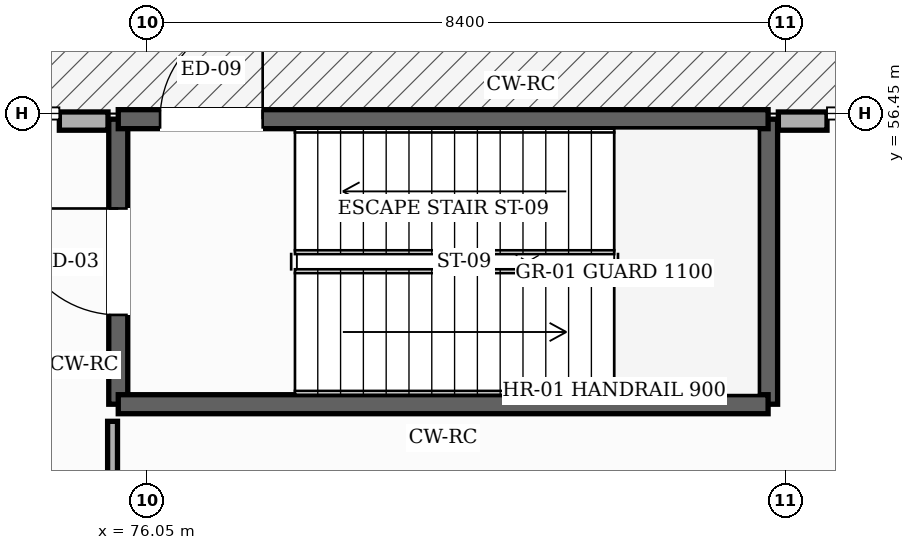
"""IFC4 building model, lengths in metres.
Left out: names, types, materials, properties, quantities, classifications, styles, units other than length and angle.
Written with IfcOpenShell. Run it as: python <this file> out.ifc"""

import sys

from ifc_helpers import new_model, si_unit, direction, frame, frame_2d, origin, place, context, subcontext, project, spatial, rectangle, extrude, element, fill, save


model = new_model("IFC4")
c1 = context("Model", 3, precision=1e-05, world=origin(), true_north=direction((0.0, 1.0)))
c2 = subcontext(c1, "Body", "Model", "MODEL_VIEW")
j1 = project(units=[si_unit("LENGTHUNIT", "METRE"), si_unit("PLANEANGLEUNIT", "RADIAN")], contexts=[c1])
p1 = place(None, origin())
s1 = spatial("IfcSite", under=j1, at=p1, CompositionType="ELEMENT")
p2 = place(p1, origin())
s2 = spatial("IfcBuilding", under=s1, at=p2, CompositionType="ELEMENT")
p3 = place(p2, origin())
s3 = spatial("IfcBuildingStorey", under=s2, at=p3, CompositionType="ELEMENT", Elevation=0.0)
p4 = place(p3, frame((74.9, 56.35, 0.0), z_axis=(0.0, 0.0, 1.0), x_axis=(1.0, 0.0, 0.0)))
e1 = element("IfcWall", 1, at=p4, inside=s3, PredefinedType="SOLIDWALL", context=c2, shape_type="SweptSolid", body=[
    extrude(rectangle(XDim=0.64, YDim=0.24, at=frame_2d((0.32, 0.0))), origin(), (0.0, 0.0, 1.0), 3.725),
])
p5 = place(p3, frame((84.36, 56.35, 0.0), z_axis=(0.0, 0.0, 1.0), x_axis=(1.0, 0.0, 0.0)))
e2 = element("IfcWall", 2, at=p5, inside=s3, PredefinedType="SOLIDWALL", context=c2, shape_type="SweptSolid", body=[
    extrude(rectangle(XDim=0.64, YDim=0.24, at=frame_2d((0.32, 0.0))), origin(), (0.0, 0.0, 1.0), 3.725),
])
p6 = place(p3, frame((75.675, 52.625, 0.0), z_axis=(0.0, 0.0, 1.0), x_axis=(0.0, 1.0, 0.0)))
e3 = element("IfcWall", 3, at=p6, inside=s3, PredefinedType="SHEAR", context=c2, shape_type="SweptSolid", body=[
    extrude(rectangle(XDim=3.75, YDim=0.25, at=frame_2d((1.875, 0.0))), origin(), (0.0, 0.0, 1.0), 5.15),
])
p7 = place(p6, frame((1.175, 0.0, 0.0)))
e4 = element("IfcOpeningElement", 4, at=p7, cuts=e3, PredefinedType="OPENING", context=c2, shape_type="SweptSolid", body=[
    extrude(rectangle(XDim=1.4, YDim=2.25, at=frame_2d((0.7, 1.125))), frame((0.0, 0.135, 0.0), z_axis=(0.0, -1.0, 0.0), x_axis=(1.0, 0.0, 0.0)), (0.0, 0.0, 1.0), 0.27),
])
p8 = place(p3, frame((84.225, 56.375, 0.0), z_axis=(0.0, 0.0, 1.0), x_axis=(0.0, -1.0, 0.0)))
e5 = element("IfcWall", 5, at=p8, inside=s3, PredefinedType="SHEAR", context=c2, shape_type="SweptSolid", body=[
    extrude(rectangle(XDim=3.75, YDim=0.25, at=frame_2d((1.875, 0.0))), origin(), (0.0, 0.0, 1.0), 5.15),
])
p9 = place(p3, frame((84.225, 52.625, 0.0), z_axis=(0.0, 0.0, 1.0), x_axis=(-1.0, 0.0, 0.0)))
e6 = element("IfcWall", 6, at=p9, inside=s3, PredefinedType="SHEAR", context=c2, shape_type="SweptSolid", body=[
    extrude(rectangle(XDim=8.55, YDim=0.25, at=frame_2d((4.275, 0.0))), origin(), (0.0, 0.0, 1.0), 5.15),
])
p10 = place(p3, frame((75.675, 56.375, 0.0), z_axis=(0.0, 0.0, 1.0), x_axis=(1.0, 0.0, 0.0)))
e7 = element("IfcWall", 7, at=p10, inside=s3, PredefinedType="SHEAR", context=c2, shape_type="SweptSolid", body=[
    extrude(rectangle(XDim=8.55, YDim=0.25, at=frame_2d((4.275, 0.0))), origin(), (0.0, 0.0, 1.0), 5.15),
])
p11 = place(p10, frame((0.55, 0.0, 0.0)))
e8 = element("IfcOpeningElement", 8, at=p11, cuts=e7, PredefinedType="OPENING", context=c2, shape_type="SweptSolid", body=[
    extrude(rectangle(XDim=1.35, YDim=2.3, at=frame_2d((0.675, 1.15))), frame((0.0, 0.135, 0.0), z_axis=(0.0, -1.0, 0.0), x_axis=(1.0, 0.0, 0.0)), (0.0, 0.0, 1.0), 0.27),
])
p12 = place(p3, frame((75.6, 16.6, 0.0), z_axis=(0.0, 0.0, 1.0), x_axis=(0.0, 1.0, 0.0)))
e9 = element("IfcWall", 9, at=p12, inside=s3, PredefinedType="PARTITIONING", context=c2, shape_type="SweptSolid", body=[
    extrude(rectangle(XDim=35.8, YDim=0.13, at=frame_2d((17.9, 0.0))), origin(), (0.0, 0.0, 1.0), 5.135),
])
p13 = place(p12, frame((0.12, 0.0, 0.0)))
e10 = element("IfcOpeningElement", 10, at=p13, cuts=e9, PredefinedType="OPENING", context=c2, shape_type="SweptSolid", body=[
    extrude(rectangle(XDim=1.85, YDim=2.4, at=frame_2d((0.925, 1.2))), frame((0.0, 0.075, 0.0), z_axis=(0.0, -1.0, 0.0), x_axis=(1.0, 0.0, 0.0)), (0.0, 0.0, 1.0), 0.15),
])
p14 = place(p12, frame((25.675, 0.0, 0.0)))
e11 = element("IfcOpeningElement", 11, at=p14, cuts=e9, PredefinedType="OPENING", context=c2, shape_type="SweptSolid", body=[
    extrude(rectangle(XDim=1.85, YDim=2.4, at=frame_2d((0.925, 1.2))), frame((0.0, 0.075, 0.0), z_axis=(0.0, -1.0, 0.0), x_axis=(1.0, 0.0, 0.0)), (0.0, 0.0, 1.0), 0.15),
])
p15 = place(p7, origin())
e12 = element("IfcDoor", 12, at=p15, inside=s3, OperationType="SINGLE_SWING_RIGHT", PredefinedType="DOOR", context=c2, shape_type="SweptSolid", body=[
    extrude(rectangle(XDim=1.4, YDim=2.25, at=frame_2d((0.7, 1.125))), frame((0.0, 0.025, 0.0), z_axis=(0.0, -1.0, 0.0), x_axis=(1.0, 0.0, 0.0)), (0.0, 0.0, 1.0), 0.05),
])
fill(e4, e12)
p16 = place(p11, origin())
e13 = element("IfcDoor", 13, at=p16, inside=s3, OperationType="SINGLE_SWING_RIGHT", PredefinedType="DOOR", context=c2, shape_type="SweptSolid", body=[
    extrude(rectangle(XDim=1.35, YDim=2.3, at=frame_2d((0.675, 1.15))), frame((0.0, 0.025, 0.0), z_axis=(0.0, -1.0, 0.0), x_axis=(1.0, 0.0, 0.0)), (0.0, 0.0, 1.0), 0.05),
])
fill(e8, e13)
save(model, sys.argv[1])
